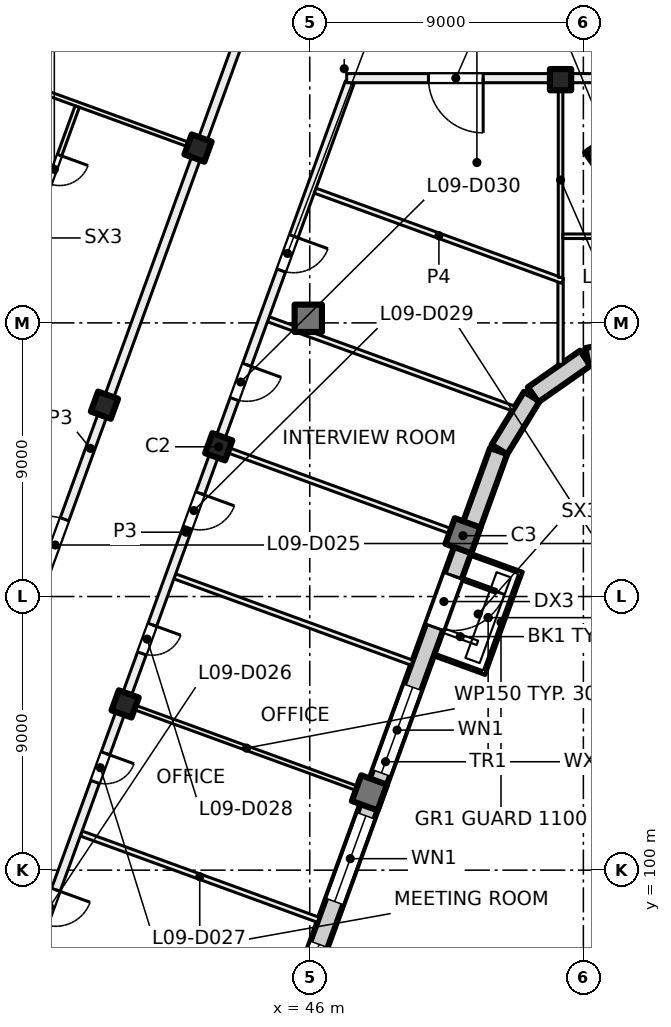
"""IFC4 building model, lengths in metres.
Left out: names, types, materials, properties, quantities, classifications, styles, units other than length and angle.
Written with IfcOpenShell. Run it as: python <this file> out.ifc"""

import sys

from ifc_helpers import new_model, si_unit, direction, frame, frame_2d, origin, origin_2d, place, context, subcontext, project, spatial, rectangle, hollow_rectangle, extrude, element, fill, save


model = new_model("IFC4")
c1 = context("Model", 3, precision=1e-05, world=origin(), true_north=direction((0.0, 1.0)))
c2 = subcontext(c1, "Body", "Model", "MODEL_VIEW")
j1 = project(units=[si_unit("LENGTHUNIT", "METRE"), si_unit("PLANEANGLEUNIT", "RADIAN")], contexts=[c1])
p1 = place(None, origin())
s1 = spatial("IfcSite", under=j1, at=p1, CompositionType="ELEMENT")
p2 = place(p1, origin())
s2 = spatial("IfcBuilding", under=s1, at=p2, CompositionType="ELEMENT")
p3 = place(p2, frame((0.0, 0.0, 43.5)))
s3 = spatial("IfcBuildingStorey", under=s2, at=p3, CompositionType="ELEMENT", Elevation=43.5)
p4 = place(p3, frame((56.036, 123.43, 0.0), z_axis=(0.0, 0.0, 1.0), x_axis=(0.573576436351, -0.819152044289, 0.0)))
e1 = element("IfcColumn", 1, at=p4, inside=s3, PredefinedType="COLUMN", context=c2, shape_type="SweptSolid", body=[
    extrude(hollow_rectangle(XDim=1.4, YDim=1.4, WallThickness=0.04, at=origin_2d()), origin(), (0.0, 0.0, 1.0), 4.0),
])
p5 = place(p3, frame((54.25, 126.0, 0.0), z_axis=(0.0, 0.0, 1.0), x_axis=(1.0, 0.0, 0.0)))
e2 = element("IfcColumn", 2, at=p5, inside=s3, PredefinedType="COLUMN", context=c2, shape_type="SweptSolid", body=[
    extrude(rectangle(XDim=0.7, YDim=0.7, at=origin_2d()), origin(), (0.0, 0.0, 1.0), 4.0),
])
p6 = place(p3, frame((45.952, 118.152, 0.0), z_axis=(0.0, 0.0, 1.0), x_axis=(1.0, 0.0, 0.0)))
e3 = element("IfcColumn", 3, at=p6, inside=s3, PredefinedType="COLUMN", context=c2, shape_type="SweptSolid", body=[
    extrude(rectangle(XDim=0.9, YDim=0.9, at=origin_2d()), origin(), (0.0, 0.0, 1.0), 4.0),
])
for number, where, z_axis, x_axis in (
    (4, (43.006, 113.925, 0.0), (0.0, 0.0, 1.0), (-0.342, -0.94, 0.0)),
    (5, (39.927, 105.468, 0.0), (0.0, 0.0, 1.0), (-0.342, -0.94, 0.0)),
    (6, (42.325, 123.751, 0.0), (0.0, 0.0, 1.0), (-0.342, -0.94, 0.0)),
    (7, (39.247, 115.293, 0.0), (0.0, 0.0, 1.0), (-0.342, -0.94, 0.0)),
):
    element("IfcColumn", number, at=place(p3, frame(where, z_axis=z_axis, x_axis=x_axis)), inside=s3, PredefinedType="COLUMN", context=c2, shape_type="SweptSolid", body=[
        extrude(rectangle(XDim=0.7, YDim=0.7, at=origin_2d()), origin(), (0.0, 0.0, 1.0), 4.0),
    ])
for number, where, z_axis, x_axis in (
    (8, (51.04, 111.001, 0.0), (0.0, 0.0, 1.0), (-0.342, -0.94, 0.0)),
    (9, (47.962, 102.544, 0.0), (0.0, 0.0, 1.0), (-0.342, -0.94, 0.0)),
):
    element("IfcColumn", number, at=place(p3, frame(where, z_axis=z_axis, x_axis=x_axis)), inside=s3, PredefinedType="COLUMN", context=c2, shape_type="SweptSolid", body=[
        extrude(rectangle(XDim=0.9, YDim=0.9, at=origin_2d()), origin(), (0.0, 0.0, 1.0), 4.0),
    ])
p7 = place(p3, frame((52.212, 113.783, 0.0), z_axis=(0.0, 0.0, 1.0), x_axis=(-0.34202521188, -0.939690775968, 0.0)))
e10 = element("IfcWall", 10, at=p7, inside=s3, PredefinedType="SOLIDWALL", context=c2, shape_type="SweptSolid", body=[
    extrude(rectangle(XDim=21.745, YDim=0.6, at=frame_2d((10.873, 0.0))), origin(), (0.0, 0.0, 1.0), 3.625),
])
p8 = place(p7, frame((4.365, 0.0, 0.0)))
e11 = element("IfcOpeningElement", 11, at=p8, cuts=e10, PredefinedType="OPENING", context=c2, shape_type="SweptSolid", body=[
    extrude(rectangle(XDim=1.8, YDim=2.4, at=frame_2d((0.9, 1.2))), frame((0.0, 0.31, 0.0), z_axis=(0.0, -1.0, 0.0), x_axis=(1.0, 0.0, 0.0)), (0.0, 0.0, 1.0), 0.62),
])
p9 = place(p7, frame((8.265, 0.0, 0.9)))
e12 = element("IfcOpeningElement", 12, at=p9, cuts=e10, PredefinedType="OPENING", context=c2, shape_type="SweptSolid", body=[
    extrude(rectangle(XDim=3.0, YDim=2.4, at=frame_2d((1.5, 1.2))), frame((0.0, 0.31, 0.0), z_axis=(0.0, -1.0, 0.0), x_axis=(1.0, 0.0, 0.0)), (0.0, 0.0, 1.0), 0.62),
])
p10 = place(p7, frame((12.765, 0.0, 0.9)))
e13 = element("IfcOpeningElement", 13, at=p10, cuts=e10, PredefinedType="OPENING", context=c2, shape_type="SweptSolid", body=[
    extrude(rectangle(XDim=3.0, YDim=2.4, at=frame_2d((1.5, 1.2))), frame((0.0, 0.31, 0.0), z_axis=(0.0, -1.0, 0.0), x_axis=(1.0, 0.0, 0.0)), (0.0, 0.0, 1.0), 0.62),
])
p11 = place(p7, frame((17.265, 0.0, 0.9)))
e14 = element("IfcOpeningElement", 14, at=p11, cuts=e10, PredefinedType="OPENING", context=c2, shape_type="SweptSolid", body=[
    extrude(rectangle(XDim=3.0, YDim=2.4, at=frame_2d((1.5, 1.2))), frame((0.0, 0.31, 0.0), z_axis=(0.0, -1.0, 0.0), x_axis=(1.0, 0.0, 0.0)), (0.0, 0.0, 1.0), 0.62),
])
p12 = place(p3, frame((53.305, 115.578, 0.0), z_axis=(0.0, 0.0, 1.0), x_axis=(-0.522402266438, -0.852699168535, 0.0)))
e15 = element("IfcWall", 15, at=p12, inside=s3, PredefinedType="SOLIDWALL", context=c2, shape_type="SweptSolid", body=[
    extrude(rectangle(XDim=2.042, YDim=0.6, at=frame_2d((1.021, 0.0))), origin(), (0.0, 0.0, 1.0), 3.625),
])
for number, where, z_axis, x_axis in (
    (16, (55.062, 116.839, 0.0), (0.0, 0.0, 1.0), (-0.819, -0.574, 0.0)),
    (17, (57.175, 117.294, 0.0), (0.0, 0.0, 1.0), (-0.98, -0.199, 0.0)),
):
    element("IfcWall", number, at=place(p3, frame(where, z_axis=z_axis, x_axis=x_axis)), inside=s3, PredefinedType="SOLIDWALL", context=c2, shape_type="SweptSolid", body=[
        extrude(rectangle(XDim=2.092, YDim=0.6, at=frame_2d((1.046, 0.0))), origin(), (0.0, 0.0, 1.0), 3.625),
    ])
p13 = place(p3, frame((32.881, 97.657, 0.0), z_axis=(0.0, 0.0, 1.0), x_axis=(0.342017360004, 0.939693633828, 0.0)))
e18 = element("IfcWall", 18, at=p13, inside=s3, PredefinedType="PARTITIONING", context=c2, shape_type="SweptSolid", body=[
    extrude(rectangle(XDim=34.516, YDim=0.3, at=frame_2d((17.258, 0.0))), origin(), (0.0, 0.0, 1.0), 3.625),
])
p14 = place(p13, frame((12.975, 0.0, 0.0)))
e19 = element("IfcOpeningElement", 19, at=p14, cuts=e18, PredefinedType="OPENING", context=c2, shape_type="SweptSolid", body=[
    extrude(rectangle(XDim=1.8, YDim=2.1, at=frame_2d((0.9, 1.05))), frame((0.0, 0.16, 0.0), z_axis=(0.0, -1.0, 0.0), x_axis=(1.0, 0.0, 0.0)), (0.0, 0.0, 1.0), 0.32),
])
p15 = place(p3, frame((34.431, 126.624, 0.0), z_axis=(0.0, 0.0, 1.0), x_axis=(0.939687752599, -0.342033518263, 0.0)))
e20 = element("IfcWall", 20, at=p15, inside=s3, PredefinedType="PARTITIONING", context=c2, shape_type="SweptSolid", body=[
    extrude(rectangle(XDim=8.301, YDim=0.15, at=frame_2d((4.15, 0.0))), origin(), (0.0, 0.0, 1.0), 3.625),
])
p16 = place(p3, frame((38.352, 125.117, 0.0), z_axis=(0.0, 0.0, 1.0), x_axis=(-0.34193355862, -0.939724130524, 0.0)))
e21 = element("IfcWall", 21, at=p16, inside=s3, PredefinedType="PARTITIONING", context=c2, shape_type="SweptSolid", body=[
    extrude(rectangle(XDim=4.425, YDim=0.15, at=frame_2d((2.212, 0.0))), origin(), (0.0, 0.0, 1.0), 3.625),
])
p17 = place(p16, frame((1.702, 0.0, 0.0)))
e22 = element("IfcOpeningElement", 22, at=p17, cuts=e21, PredefinedType="OPENING", context=c2, shape_type="SweptSolid", body=[
    extrude(rectangle(XDim=1.0, YDim=2.1, at=frame_2d((0.5, 1.05))), frame((0.0, 0.085, 0.0), z_axis=(0.0, -1.0, 0.0), x_axis=(1.0, 0.0, 0.0)), (0.0, 0.0, 1.0), 0.17),
])
p18 = place(p3, frame((38.482, 101.206, 0.0), z_axis=(0.0, 0.0, 1.0), x_axis=(0.939687752599, -0.342033518263, 0.0)))
e23 = element("IfcWall", 23, at=p18, inside=s3, PredefinedType="PARTITIONING", context=c2, shape_type="SweptSolid", body=[
    extrude(rectangle(XDim=8.301, YDim=0.175, at=frame_2d((4.15, 0.0))), origin(), (0.0, 0.0, 1.0), 3.625),
])
p19 = place(p3, frame((40.021, 105.434, 0.0), z_axis=(0.0, 0.0, 1.0), x_axis=(0.939687752599, -0.342033518263, 0.0)))
e24 = element("IfcWall", 24, at=p19, inside=s3, PredefinedType="PARTITIONING", context=c2, shape_type="SweptSolid", body=[
    extrude(rectangle(XDim=8.301, YDim=0.15, at=frame_2d((4.15, 0.0))), origin(), (0.0, 0.0, 1.0), 3.625),
])
p20 = place(p3, frame((41.561, 109.663, 0.0), z_axis=(0.0, 0.0, 1.0), x_axis=(0.939673986983, -0.342071334939, 0.0)))
e25 = element("IfcWall", 25, at=p20, inside=s3, PredefinedType="PARTITIONING", context=c2, shape_type="SweptSolid", body=[
    extrude(rectangle(XDim=8.3, YDim=0.175, at=frame_2d((4.15, 0.0))), origin(), (0.0, 0.0, 1.0), 3.625),
])
p21 = place(p3, frame((43.1, 113.891, 0.0), z_axis=(0.0, 0.0, 1.0), x_axis=(0.939670544866, -0.342080790328, 0.0)))
e26 = element("IfcWall", 26, at=p21, inside=s3, PredefinedType="PARTITIONING", context=c2, shape_type="SweptSolid", body=[
    extrude(rectangle(XDim=8.3, YDim=0.175, at=frame_2d((4.15, 0.0))), origin(), (0.0, 0.0, 1.0), 3.625),
])
p22 = place(p3, frame((44.639, 118.12, 0.0), z_axis=(0.0, 0.0, 1.0), x_axis=(0.939669707102, -0.342083091593, 0.0)))
e27 = element("IfcWall", 27, at=p22, inside=s3, PredefinedType="PARTITIONING", context=c2, shape_type="SweptSolid", body=[
    extrude(rectangle(XDim=8.589, YDim=0.175, at=frame_2d((4.295, 0.0))), origin(), (0.0, 0.0, 1.0), 3.625),
])
p23 = place(p3, frame((47.314, 125.909, 0.0), z_axis=(0.0, 0.0, 1.0), x_axis=(-0.342010770371, -0.939696032209, 0.0)))
e28 = element("IfcWall", 28, at=p23, inside=s3, PredefinedType="PARTITIONING", context=c2, shape_type="SweptSolid", body=[
    extrude(rectangle(XDim=31.485, YDim=0.3, at=frame_2d((15.742, 0.0))), origin(), (0.0, 0.0, 1.0), 3.625),
])
p24 = place(p23, frame((28.259, 0.0, 0.0)))
e29 = element("IfcOpeningElement", 29, at=p24, cuts=e28, PredefinedType="OPENING", context=c2, shape_type="SweptSolid", body=[
    extrude(rectangle(XDim=1.2, YDim=2.1, at=frame_2d((0.6, 1.05))), frame((0.0, 0.16, 0.0), z_axis=(0.0, -1.0, 0.0), x_axis=(1.0, 0.0, 0.0)), (0.0, 0.0, 1.0), 0.32),
])
p25 = place(p23, frame((23.484, 0.0, 0.0)))
e30 = element("IfcOpeningElement", 30, at=p25, cuts=e28, PredefinedType="OPENING", context=c2, shape_type="SweptSolid", body=[
    extrude(rectangle(XDim=1.0, YDim=2.1, at=frame_2d((0.5, 1.05))), frame((0.0, 0.16, 0.0), z_axis=(0.0, -1.0, 0.0), x_axis=(1.0, 0.0, 0.0)), (0.0, 0.0, 1.0), 0.32),
])
p26 = place(p23, frame((18.984, 0.0, 0.0)))
e31 = element("IfcOpeningElement", 31, at=p26, cuts=e28, PredefinedType="OPENING", context=c2, shape_type="SweptSolid", body=[
    extrude(rectangle(XDim=1.0, YDim=2.1, at=frame_2d((0.5, 1.05))), frame((0.0, 0.16, 0.0), z_axis=(0.0, -1.0, 0.0), x_axis=(1.0, 0.0, 0.0)), (0.0, 0.0, 1.0), 0.32),
])
p27 = place(p23, frame((14.385, 0.0, 0.0)))
e32 = element("IfcOpeningElement", 32, at=p27, cuts=e28, PredefinedType="OPENING", context=c2, shape_type="SweptSolid", body=[
    extrude(rectangle(XDim=1.2, YDim=2.1, at=frame_2d((0.6, 1.05))), frame((0.0, 0.16, 0.0), z_axis=(0.0, -1.0, 0.0), x_axis=(1.0, 0.0, 0.0)), (0.0, 0.0, 1.0), 0.32),
])
p28 = place(p23, frame((9.885, 0.0, 0.0)))
e33 = element("IfcOpeningElement", 33, at=p28, cuts=e28, PredefinedType="OPENING", context=c2, shape_type="SweptSolid", body=[
    extrude(rectangle(XDim=1.2, YDim=2.1, at=frame_2d((0.6, 1.05))), frame((0.0, 0.16, 0.0), z_axis=(0.0, -1.0, 0.0), x_axis=(1.0, 0.0, 0.0)), (0.0, 0.0, 1.0), 0.32),
])
p29 = place(p23, frame((5.384, 0.0, 0.0)))
e34 = element("IfcOpeningElement", 34, at=p29, cuts=e28, PredefinedType="OPENING", context=c2, shape_type="SweptSolid", body=[
    extrude(rectangle(XDim=1.2, YDim=2.1, at=frame_2d((0.6, 1.05))), frame((0.0, 0.16, 0.0), z_axis=(0.0, -1.0, 0.0), x_axis=(1.0, 0.0, 0.0)), (0.0, 0.0, 1.0), 0.32),
])
p30 = place(p3, frame((54.25, 116.637, 0.0), z_axis=(0.0, 0.0, 1.0), x_axis=(0.0, 1.0, 0.0)))
e35 = element("IfcWall", 35, at=p30, inside=s3, PredefinedType="PARTITIONING", context=c2, shape_type="SweptSolid", body=[
    extrude(rectangle(XDim=2.776, YDim=0.175, at=frame_2d((1.388, 0.0))), origin(), (0.0, 0.0, 1.0), 3.625),
])
p31 = place(p3, frame((54.32, 119.384, 0.0), z_axis=(0.0, 0.0, 1.0), x_axis=(-0.939632908118, 0.342184157994, 0.0)))
e36 = element("IfcWall", 36, at=p31, inside=s3, PredefinedType="PARTITIONING", context=c2, shape_type="SweptSolid", body=[
    extrude(rectangle(XDim=8.665, YDim=0.175, at=frame_2d((4.333, 0.0))), origin(), (0.0, 0.0, 1.0), 3.625),
])
p32 = place(p3, frame((54.25, 119.498, 0.0), z_axis=(0.0, 0.0, 1.0), x_axis=(0.0, 1.0, 0.0)))
e37 = element("IfcWall", 37, at=p32, inside=s3, PredefinedType="PARTITIONING", context=c2, shape_type="SweptSolid", body=[
    extrude(rectangle(XDim=6.402, YDim=0.15, at=frame_2d((3.201, 0.0))), origin(), (0.0, 0.0, 1.0), 3.625),
])
p33 = place(p3, frame((54.325, 120.85, 0.0), z_axis=(0.0, 0.0, 1.0), x_axis=(1.0, 0.0, 0.0)))
e38 = element("IfcWall", 38, at=p33, inside=s3, PredefinedType="PARTITIONING", context=c2, shape_type="SweptSolid", body=[
    extrude(rectangle(XDim=4.35, YDim=0.15, at=frame_2d((2.175, 0.0))), origin(), (0.0, 0.0, 1.0), 3.625),
])
p34 = place(p33, frame((1.675, 0.0, 0.0)))
e39 = element("IfcOpeningElement", 39, at=p34, cuts=e38, PredefinedType="OPENING", context=c2, shape_type="SweptSolid", body=[
    extrude(rectangle(XDim=1.0, YDim=2.1, at=frame_2d((0.5, 1.05))), frame((0.0, 0.085, 0.0), z_axis=(0.0, -1.0, 0.0), x_axis=(1.0, 0.0, 0.0)), (0.0, 0.0, 1.0), 0.17),
])
p35 = place(p3, frame((91.0, 126.05, 0.0), z_axis=(0.0, 0.0, 1.0), x_axis=(-1.0, 0.0, 0.0)))
e40 = element("IfcWall", 40, at=p35, inside=s3, PredefinedType="PARTITIONING", context=c2, shape_type="SweptSolid", body=[
    extrude(rectangle(XDim=43.785, YDim=0.3, at=frame_2d((21.893, 0.0))), origin(), (0.0, 0.0, 1.0), 3.625),
])
p36 = place(p35, frame((4.375, 0.0, 0.0)))
e41 = element("IfcOpeningElement", 41, at=p36, cuts=e40, PredefinedType="OPENING", context=c2, shape_type="SweptSolid", body=[
    extrude(rectangle(XDim=1.0, YDim=2.1, at=frame_2d((0.5, 1.05))), frame((0.0, 0.16, 0.0), z_axis=(0.0, -1.0, 0.0), x_axis=(1.0, 0.0, 0.0)), (0.0, 0.0, 1.0), 0.32),
])
p37 = place(p35, frame((15.0, 0.0, 0.0)))
e42 = element("IfcOpeningElement", 42, at=p37, cuts=e40, PredefinedType="OPENING", context=c2, shape_type="SweptSolid", body=[
    extrude(rectangle(XDim=1.0, YDim=2.1, at=frame_2d((0.5, 1.05))), frame((0.0, 0.16, 0.0), z_axis=(0.0, -1.0, 0.0), x_axis=(1.0, 0.0, 0.0)), (0.0, 0.0, 1.0), 0.32),
])
p38 = place(p35, frame((34.0, 0.0, 0.0)))
e43 = element("IfcOpeningElement", 43, at=p38, cuts=e40, PredefinedType="OPENING", context=c2, shape_type="SweptSolid", body=[
    extrude(rectangle(XDim=1.0, YDim=2.1, at=frame_2d((0.5, 1.05))), frame((0.0, 0.16, 0.0), z_axis=(0.0, -1.0, 0.0), x_axis=(1.0, 0.0, 0.0)), (0.0, 0.0, 1.0), 0.32),
])
p39 = place(p35, frame((39.296, 0.0, 0.0)))
e44 = element("IfcOpeningElement", 44, at=p39, cuts=e40, PredefinedType="OPENING", context=c2, shape_type="SweptSolid", body=[
    extrude(rectangle(XDim=1.8, YDim=2.1, at=frame_2d((0.9, 1.05))), frame((0.0, 0.16, 0.0), z_axis=(0.0, -1.0, 0.0), x_axis=(1.0, 0.0, 0.0)), (0.0, 0.0, 1.0), 0.32),
])
p40 = place(p8, origin())
e45 = element("IfcDoor", 45, at=p40, inside=s3, OperationType="DOUBLE_DOOR_SINGLE_SWING", PredefinedType="DOOR", context=c2, shape_type="SweptSolid", body=[
    extrude(rectangle(XDim=1.8, YDim=2.4, at=frame_2d((0.9, 1.2))), frame((0.0, 0.025, 0.0), z_axis=(0.0, -1.0, 0.0), x_axis=(1.0, 0.0, 0.0)), (0.0, 0.0, 1.0), 0.05),
])
fill(e11, e45)
p41 = place(p9, origin())
e46 = element("IfcWindow", 46, at=p41, inside=s3, PartitioningType="SINGLE_PANEL", PredefinedType="WINDOW", context=c2, shape_type="SweptSolid", body=[
    extrude(rectangle(XDim=3.0, YDim=2.4, at=frame_2d((1.5, 1.2))), frame((0.0, 0.03, 0.0), z_axis=(0.0, -1.0, 0.0), x_axis=(1.0, 0.0, 0.0)), (0.0, 0.0, 1.0), 0.06),
])
fill(e12, e46)
p42 = place(p10, origin())
e47 = element("IfcWindow", 47, at=p42, inside=s3, PartitioningType="SINGLE_PANEL", PredefinedType="WINDOW", context=c2, shape_type="SweptSolid", body=[
    extrude(rectangle(XDim=3.0, YDim=2.4, at=frame_2d((1.5, 1.2))), frame((0.0, 0.03, 0.0), z_axis=(0.0, -1.0, 0.0), x_axis=(1.0, 0.0, 0.0)), (0.0, 0.0, 1.0), 0.06),
])
fill(e13, e47)
p43 = place(p11, origin())
e48 = element("IfcWindow", 48, at=p43, inside=s3, PartitioningType="SINGLE_PANEL", PredefinedType="WINDOW", context=c2, shape_type="SweptSolid", body=[
    extrude(rectangle(XDim=3.0, YDim=2.4, at=frame_2d((1.5, 1.2))), frame((0.0, 0.03, 0.0), z_axis=(0.0, -1.0, 0.0), x_axis=(1.0, 0.0, 0.0)), (0.0, 0.0, 1.0), 0.06),
])
fill(e14, e48)
p44 = place(p17, origin())
e49 = element("IfcDoor", 49, at=p44, inside=s3, OperationType="SINGLE_SWING_RIGHT", PredefinedType="DOOR", context=c2, shape_type="SweptSolid", body=[
    extrude(rectangle(XDim=1.0, YDim=2.1, at=frame_2d((0.5, 1.05))), frame((0.0, 0.025, 0.0), z_axis=(0.0, -1.0, 0.0), x_axis=(1.0, 0.0, 0.0)), (0.0, 0.0, 1.0), 0.05),
])
fill(e22, e49)
p45 = place(p14, origin())
e50 = element("IfcDoor", 50, at=p45, inside=s3, OperationType="DOUBLE_DOOR_SINGLE_SWING", PredefinedType="DOOR", context=c2, shape_type="SweptSolid", body=[
    extrude(rectangle(XDim=1.8, YDim=2.1, at=frame_2d((0.9, 1.05))), frame((0.0, 0.025, 0.0), z_axis=(0.0, -1.0, 0.0), x_axis=(1.0, 0.0, 0.0)), (0.0, 0.0, 1.0), 0.05),
])
fill(e19, e50)
p46 = place(p24, origin())
e51 = element("IfcDoor", 51, at=p46, inside=s3, OperationType="DOUBLE_DOOR_SINGLE_SWING", PredefinedType="DOOR", context=c2, shape_type="SweptSolid", body=[
    extrude(rectangle(XDim=1.2, YDim=2.1, at=frame_2d((0.6, 1.05))), frame((0.0, 0.025, 0.0), z_axis=(0.0, -1.0, 0.0), x_axis=(1.0, 0.0, 0.0)), (0.0, 0.0, 1.0), 0.05),
])
fill(e29, e51)
p47 = place(p25, origin())
e52 = element("IfcDoor", 52, at=p47, inside=s3, OperationType="SINGLE_SWING_LEFT", PredefinedType="DOOR", context=c2, shape_type="SweptSolid", body=[
    extrude(rectangle(XDim=1.0, YDim=2.1, at=frame_2d((0.5, 1.05))), frame((0.0, 0.025, 0.0), z_axis=(0.0, -1.0, 0.0), x_axis=(1.0, 0.0, 0.0)), (0.0, 0.0, 1.0), 0.05),
])
fill(e30, e52)
p48 = place(p26, origin())
e53 = element("IfcDoor", 53, at=p48, inside=s3, OperationType="SINGLE_SWING_LEFT", PredefinedType="DOOR", context=c2, shape_type="SweptSolid", body=[
    extrude(rectangle(XDim=1.0, YDim=2.1, at=frame_2d((0.5, 1.05))), frame((0.0, 0.025, 0.0), z_axis=(0.0, -1.0, 0.0), x_axis=(1.0, 0.0, 0.0)), (0.0, 0.0, 1.0), 0.05),
])
fill(e31, e53)
p49 = place(p27, origin())
e54 = element("IfcDoor", 54, at=p49, inside=s3, OperationType="DOUBLE_DOOR_SINGLE_SWING", PredefinedType="DOOR", context=c2, shape_type="SweptSolid", body=[
    extrude(rectangle(XDim=1.2, YDim=2.1, at=frame_2d((0.6, 1.05))), frame((0.0, 0.025, 0.0), z_axis=(0.0, -1.0, 0.0), x_axis=(1.0, 0.0, 0.0)), (0.0, 0.0, 1.0), 0.05),
])
fill(e32, e54)
p50 = place(p28, origin())
e55 = element("IfcDoor", 55, at=p50, inside=s3, OperationType="DOUBLE_DOOR_SINGLE_SWING", PredefinedType="DOOR", context=c2, shape_type="SweptSolid", body=[
    extrude(rectangle(XDim=1.2, YDim=2.1, at=frame_2d((0.6, 1.05))), frame((0.0, 0.025, 0.0), z_axis=(0.0, -1.0, 0.0), x_axis=(1.0, 0.0, 0.0)), (0.0, 0.0, 1.0), 0.05),
])
fill(e33, e55)
p51 = place(p29, origin())
e56 = element("IfcDoor", 56, at=p51, inside=s3, OperationType="DOUBLE_DOOR_SINGLE_SWING", PredefinedType="DOOR", context=c2, shape_type="SweptSolid", body=[
    extrude(rectangle(XDim=1.2, YDim=2.1, at=frame_2d((0.6, 1.05))), frame((0.0, 0.025, 0.0), z_axis=(0.0, -1.0, 0.0), x_axis=(1.0, 0.0, 0.0)), (0.0, 0.0, 1.0), 0.05),
])
fill(e34, e56)
p52 = place(p39, origin())
e57 = element("IfcDoor", 57, at=p52, inside=s3, OperationType="DOUBLE_DOOR_SINGLE_SWING", PredefinedType="DOOR", context=c2, shape_type="SweptSolid", body=[
    extrude(rectangle(XDim=1.8, YDim=2.1, at=frame_2d((0.9, 1.05))), frame((0.0, 0.025, 0.0), z_axis=(0.0, -1.0, 0.0), x_axis=(1.0, 0.0, 0.0)), (0.0, 0.0, 1.0), 0.05),
])
fill(e44, e57)
save(model, sys.argv[1])
